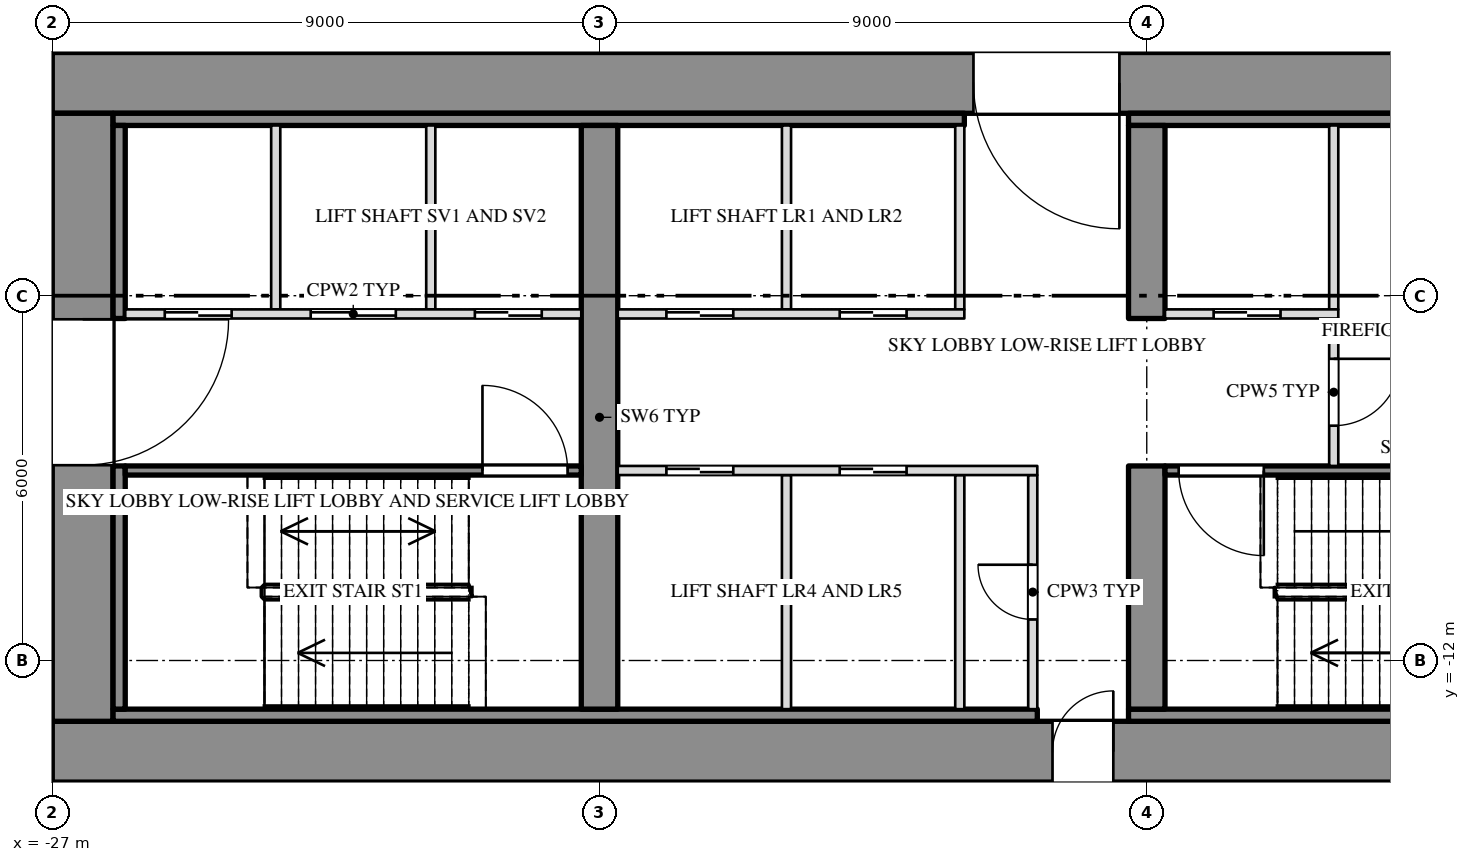
"""IFC4 building model, lengths in metres.
Left out: names, types, materials, properties, quantities, classifications, styles, units other than length and angle.
Written with IfcOpenShell. Run it as: python <this file> out.ifc"""

import sys

from ifc_helpers import new_model, si_unit, direction, frame, frame_2d, origin, place, context, subcontext, project, spatial, rectangle, extrude, element, fill, save


model = new_model("IFC4")
c1 = context("Model", 3, precision=1e-05, world=origin(), true_north=direction((0.0, 1.0)))
c2 = subcontext(c1, "Body", "Model", "MODEL_VIEW")
j1 = project(units=[si_unit("LENGTHUNIT", "METRE"), si_unit("PLANEANGLEUNIT", "RADIAN")], contexts=[c1])
p1 = place(None, origin())
s1 = spatial("IfcSite", under=j1, at=p1, CompositionType="ELEMENT")
p2 = place(p1, origin())
s2 = spatial("IfcBuilding", under=s1, at=p2, CompositionType="ELEMENT")
p3 = place(p2, frame((0.0, 0.0, 156.5)))
s3 = spatial("IfcBuildingStorey", under=s2, at=p3, CompositionType="ELEMENT", Elevation=156.5)
p4 = place(p3, frame((-27.0, -2.5, 0.0), z_axis=(0.0, 0.0, 1.0), x_axis=(1.0, 0.0, 0.0)))
e1 = element("IfcWall", 1, at=p4, inside=s3, PredefinedType="SHEAR", context=c2, shape_type="SweptSolid", body=[
    extrude(rectangle(XDim=54.0, YDim=1.0, at=frame_2d((27.0, 0.0))), origin(), (0.0, 0.0, 1.0), 3.65),
])
p5 = place(p4, frame((15.15, 0.0, 0.0)))
e2 = element("IfcOpeningElement", 2, at=p5, cuts=e1, PredefinedType="OPENING", context=c2, shape_type="SweptSolid", body=[
    extrude(rectangle(XDim=2.4, YDim=2.1, at=frame_2d((1.2, 1.05))), frame((0.0, 0.512, 0.0), z_axis=(0.0, -1.0, 0.0), x_axis=(1.0, 0.0, 0.0)), (0.0, 0.0, 1.0), 1.024),
])
p6 = place(p4, frame((36.45, 0.0, 0.0)))
e3 = element("IfcOpeningElement", 3, at=p6, cuts=e1, PredefinedType="OPENING", context=c2, shape_type="SweptSolid", body=[
    extrude(rectangle(XDim=2.4, YDim=2.1, at=frame_2d((1.2, 1.05))), frame((0.0, 0.512, 0.0), z_axis=(0.0, -1.0, 0.0), x_axis=(1.0, 0.0, 0.0)), (0.0, 0.0, 1.0), 1.024),
])
p7 = place(p3, frame((-27.0, -13.5, 0.0), z_axis=(0.0, 0.0, 1.0), x_axis=(1.0, 0.0, 0.0)))
e4 = element("IfcWall", 4, at=p7, inside=s3, PredefinedType="SHEAR", context=c2, shape_type="SweptSolid", body=[
    extrude(rectangle(XDim=54.0, YDim=1.0, at=frame_2d((27.0, 0.0))), origin(), (0.0, 0.0, 1.0), 3.65),
])
p8 = place(p7, frame((16.45, 0.0, 0.0)))
e5 = element("IfcOpeningElement", 5, at=p8, cuts=e4, PredefinedType="OPENING", context=c2, shape_type="SweptSolid", body=[
    extrude(rectangle(XDim=1.0, YDim=2.1, at=frame_2d((0.5, 1.05))), frame((0.0, 0.512, 0.0), z_axis=(0.0, -1.0, 0.0), x_axis=(1.0, 0.0, 0.0)), (0.0, 0.0, 1.0), 1.024),
])
p9 = place(p7, frame((36.55, 0.0, 0.0)))
e6 = element("IfcOpeningElement", 6, at=p9, cuts=e4, PredefinedType="OPENING", context=c2, shape_type="SweptSolid", body=[
    extrude(rectangle(XDim=1.0, YDim=2.1, at=frame_2d((0.5, 1.05))), frame((0.0, 0.512, 0.0), z_axis=(0.0, -1.0, 0.0), x_axis=(1.0, 0.0, 0.0)), (0.0, 0.0, 1.0), 1.024),
])
p10 = place(p3, frame((-26.5, -13.0, 0.0), z_axis=(0.0, 0.0, 1.0), x_axis=(0.0, 1.0, 0.0)))
e7 = element("IfcWall", 7, at=p10, inside=s3, PredefinedType="SHEAR", context=c2, shape_type="SweptSolid", body=[
    extrude(rectangle(XDim=10.0, YDim=1.0, at=frame_2d((5.0, 0.0))), origin(), (0.0, 0.0, 1.0), 3.65),
])
p11 = place(p10, frame((4.212, 0.0, 0.0)))
e8 = element("IfcOpeningElement", 8, at=p11, cuts=e7, PredefinedType="OPENING", context=c2, shape_type="SweptSolid", body=[
    extrude(rectangle(XDim=2.4, YDim=2.1, at=frame_2d((1.2, 1.05))), frame((0.0, 0.512, 0.0), z_axis=(0.0, -1.0, 0.0), x_axis=(1.0, 0.0, 0.0)), (0.0, 0.0, 1.0), 1.024),
])
p12 = place(p3, frame((-26.0, -3.1, 0.0), z_axis=(0.0, 0.0, 1.0), x_axis=(1.0, 0.0, 0.0)))
e9 = element("IfcWall", 9, at=p12, inside=s3, PredefinedType="SHEAR", context=c2, shape_type="SweptSolid", body=[
    extrude(rectangle(XDim=14.0, YDim=0.2, at=frame_2d((7.0, 0.0))), origin(), (0.0, 0.0, 1.0), 3.65),
])
p13 = place(p3, frame((-9.3, -3.1, 0.0), z_axis=(0.0, 0.0, 1.0), x_axis=(1.0, 0.0, 0.0)))
e10 = element("IfcWall", 10, at=p13, inside=s3, PredefinedType="SHEAR", context=c2, shape_type="SweptSolid", body=[
    extrude(rectangle(XDim=18.6, YDim=0.2, at=frame_2d((9.3, 0.0))), origin(), (0.0, 0.0, 1.0), 3.65),
])
p14 = place(p3, frame((-26.0, -12.9, 0.0), z_axis=(0.0, 0.0, 1.0), x_axis=(1.0, 0.0, 0.0)))
e11 = element("IfcWall", 11, at=p14, inside=s3, PredefinedType="SHEAR", context=c2, shape_type="SweptSolid", body=[
    extrude(rectangle(XDim=15.2, YDim=0.2, at=frame_2d((7.6, 0.0))), origin(), (0.0, 0.0, 1.0), 3.65),
])
p15 = place(p3, frame((-9.3, -12.9, 0.0), z_axis=(0.0, 0.0, 1.0), x_axis=(1.0, 0.0, 0.0)))
e12 = element("IfcWall", 12, at=p15, inside=s3, PredefinedType="SHEAR", context=c2, shape_type="SweptSolid", body=[
    extrude(rectangle(XDim=18.6, YDim=0.2, at=frame_2d((9.3, 0.0))), origin(), (0.0, 0.0, 1.0), 3.65),
])
p16 = place(p3, frame((-25.9, -12.8, 0.0), z_axis=(0.0, 0.0, 1.0), x_axis=(0.0, 1.0, 0.0)))
e13 = element("IfcWall", 13, at=p16, inside=s3, PredefinedType="SHEAR", context=c2, shape_type="SweptSolid", body=[
    extrude(rectangle(XDim=4.0, YDim=0.2, at=frame_2d((2.0, 0.0))), origin(), (0.0, 0.0, 1.0), 3.65),
])
p17 = place(p3, frame((-25.9, -6.375, 0.0), z_axis=(0.0, 0.0, 1.0), x_axis=(0.0, 1.0, 0.0)))
e14 = element("IfcWall", 14, at=p17, inside=s3, PredefinedType="SHEAR", context=c2, shape_type="SweptSolid", body=[
    extrude(rectangle(XDim=3.175, YDim=0.2, at=frame_2d((1.587, 0.0))), origin(), (0.0, 0.0, 1.0), 3.65),
])
p18 = place(p3, frame((-18.0, -12.8, 0.0), z_axis=(0.0, 0.0, 1.0), x_axis=(0.0, 1.0, 0.0)))
e15 = element("IfcWall", 15, at=p18, inside=s3, PredefinedType="SHEAR", context=c2, shape_type="SweptSolid", body=[
    extrude(rectangle(XDim=9.6, YDim=0.6, at=frame_2d((4.8, 0.0))), origin(), (0.0, 0.0, 1.0), 3.65),
])
p19 = place(p3, frame((-9.0, -12.8, 0.0), z_axis=(0.0, 0.0, 1.0), x_axis=(0.0, 1.0, 0.0)))
e16 = element("IfcWall", 16, at=p19, inside=s3, PredefinedType="SHEAR", context=c2, shape_type="SweptSolid", body=[
    extrude(rectangle(XDim=4.0, YDim=0.6, at=frame_2d((2.0, 0.0))), origin(), (0.0, 0.0, 1.0), 3.65),
])
p20 = place(p3, frame((-9.0, -6.375, 0.0), z_axis=(0.0, 0.0, 1.0), x_axis=(0.0, 1.0, 0.0)))
e17 = element("IfcWall", 17, at=p20, inside=s3, PredefinedType="SHEAR", context=c2, shape_type="SweptSolid", body=[
    extrude(rectangle(XDim=3.175, YDim=0.6, at=frame_2d((1.587, 0.0))), origin(), (0.0, 0.0, 1.0), 3.65),
])
for number, where, z_axis, x_axis in (
    (18, (-20.775, -6.225, 0.0), (0.0, 0.0, 1.0), (0.0, 1.0, 0.0)),
    (19, (-23.325, -6.225, 0.0), (0.0, 0.0, 1.0), (0.0, 1.0, 0.0)),
    (20, (-12.075, -6.225, 0.0), (0.0, 0.0, 1.0), (0.0, 1.0, 0.0)),
    (21, (-14.925, -6.225, 0.0), (0.0, 0.0, 1.0), (0.0, 1.0, 0.0)),
    (22, (-5.925, -6.225, 0.0), (0.0, 0.0, 1.0), (0.0, 1.0, 0.0)),
):
    element("IfcWall", number, at=place(p3, frame(where, z_axis=z_axis, x_axis=x_axis)), inside=s3, PredefinedType="PARTITIONING", context=c2, shape_type="SweptSolid", body=[
        extrude(rectangle(XDim=3.025, YDim=0.15, at=frame_2d((1.513, 0.0))), origin(), (0.0, 0.0, 1.0), 3.65),
    ])
p21 = place(p3, frame((-10.875, -12.8, 0.0), z_axis=(0.0, 0.0, 1.0), x_axis=(0.0, 1.0, 0.0)))
e23 = element("IfcWall", 23, at=p21, inside=s3, PredefinedType="PARTITIONING", context=c2, shape_type="SweptSolid", body=[
    extrude(rectangle(XDim=3.85, YDim=0.15, at=frame_2d((1.925, 0.0))), origin(), (0.0, 0.0, 1.0), 3.65),
])
p22 = place(p21, frame((1.475, 0.0, 0.0)))
e24 = element("IfcOpeningElement", 24, at=p22, cuts=e23, PredefinedType="OPENING", context=c2, shape_type="SweptSolid", body=[
    extrude(rectangle(XDim=0.9, YDim=2.1, at=frame_2d((0.45, 1.05))), frame((0.0, 0.087, 0.0), z_axis=(0.0, -1.0, 0.0), x_axis=(1.0, 0.0, 0.0)), (0.0, 0.0, 1.0), 0.174),
])
for number, where, z_axis, x_axis in (
    (25, (-12.075, -12.8, 0.0), (0.0, 0.0, 1.0), (0.0, 1.0, 0.0)),
    (26, (-14.925, -12.8, 0.0), (0.0, 0.0, 1.0), (0.0, 1.0, 0.0)),
):
    element("IfcWall", number, at=place(p3, frame(where, z_axis=z_axis, x_axis=x_axis)), inside=s3, PredefinedType="PARTITIONING", context=c2, shape_type="SweptSolid", body=[
        extrude(rectangle(XDim=3.85, YDim=0.15, at=frame_2d((1.925, 0.0))), origin(), (0.0, 0.0, 1.0), 3.65),
    ])
p23 = place(p3, frame((-5.925, -8.8, 0.0), z_axis=(0.0, 0.0, 1.0), x_axis=(0.0, 1.0, 0.0)))
e27 = element("IfcWall", 27, at=p23, inside=s3, PredefinedType="PARTITIONING", context=c2, shape_type="SweptSolid", body=[
    extrude(rectangle(XDim=2.425, YDim=0.15, at=frame_2d((1.212, 0.0))), origin(), (0.0, 0.0, 1.0), 3.65),
])
p24 = place(p23, frame((0.662, 0.0, 0.0)))
e28 = element("IfcOpeningElement", 28, at=p24, cuts=e27, PredefinedType="OPENING", context=c2, shape_type="SweptSolid", body=[
    extrude(rectangle(XDim=1.1, YDim=2.1, at=frame_2d((0.55, 1.05))), frame((0.0, 0.087, 0.0), z_axis=(0.0, -1.0, 0.0), x_axis=(1.0, 0.0, 0.0)), (0.0, 0.0, 1.0), 0.174),
])
p25 = place(p3, frame((-25.8, -6.3, 0.0), z_axis=(0.0, 0.0, 1.0), x_axis=(1.0, 0.0, 0.0)))
e29 = element("IfcWall", 29, at=p25, inside=s3, PredefinedType="PARTITIONING", context=c2, shape_type="SweptSolid", body=[
    extrude(rectangle(XDim=7.5, YDim=0.15, at=frame_2d((3.75, 0.0))), origin(), (0.0, 0.0, 1.0), 3.65),
])
p26 = place(p25, frame((0.65, 0.0, 0.0)))
e30 = element("IfcOpeningElement", 30, at=p26, cuts=e29, PredefinedType="OPENING", context=c2, shape_type="SweptSolid", body=[
    extrude(rectangle(XDim=1.1, YDim=2.1, at=frame_2d((0.55, 1.05))), frame((0.0, 0.087, 0.0), z_axis=(0.0, -1.0, 0.0), x_axis=(1.0, 0.0, 0.0)), (0.0, 0.0, 1.0), 0.174),
])
p27 = place(p25, frame((3.05, 0.0, 0.0)))
e31 = element("IfcOpeningElement", 31, at=p27, cuts=e29, PredefinedType="OPENING", context=c2, shape_type="SweptSolid", body=[
    extrude(rectangle(XDim=1.4, YDim=2.1, at=frame_2d((0.7, 1.05))), frame((0.0, 0.087, 0.0), z_axis=(0.0, -1.0, 0.0), x_axis=(1.0, 0.0, 0.0)), (0.0, 0.0, 1.0), 0.174),
])
p28 = place(p25, frame((5.75, 0.0, 0.0)))
e32 = element("IfcOpeningElement", 32, at=p28, cuts=e29, PredefinedType="OPENING", context=c2, shape_type="SweptSolid", body=[
    extrude(rectangle(XDim=1.1, YDim=2.1, at=frame_2d((0.55, 1.05))), frame((0.0, 0.087, 0.0), z_axis=(0.0, -1.0, 0.0), x_axis=(1.0, 0.0, 0.0)), (0.0, 0.0, 1.0), 0.174),
])
p29 = place(p3, frame((-17.7, -6.3, 0.0), z_axis=(0.0, 0.0, 1.0), x_axis=(1.0, 0.0, 0.0)))
e33 = element("IfcWall", 33, at=p29, inside=s3, PredefinedType="PARTITIONING", context=c2, shape_type="SweptSolid", body=[
    extrude(rectangle(XDim=5.7, YDim=0.15, at=frame_2d((2.85, 0.0))), origin(), (0.0, 0.0, 1.0), 3.65),
])
p30 = place(p29, frame((0.8, 0.0, 0.0)))
e34 = element("IfcOpeningElement", 34, at=p30, cuts=e33, PredefinedType="OPENING", context=c2, shape_type="SweptSolid", body=[
    extrude(rectangle(XDim=1.1, YDim=2.1, at=frame_2d((0.55, 1.05))), frame((0.0, 0.087, 0.0), z_axis=(0.0, -1.0, 0.0), x_axis=(1.0, 0.0, 0.0)), (0.0, 0.0, 1.0), 0.174),
])
p31 = place(p29, frame((3.65, 0.0, 0.0)))
e35 = element("IfcOpeningElement", 35, at=p31, cuts=e33, PredefinedType="OPENING", context=c2, shape_type="SweptSolid", body=[
    extrude(rectangle(XDim=1.1, YDim=2.1, at=frame_2d((0.55, 1.05))), frame((0.0, 0.087, 0.0), z_axis=(0.0, -1.0, 0.0), x_axis=(1.0, 0.0, 0.0)), (0.0, 0.0, 1.0), 0.174),
])
p32 = place(p3, frame((-8.7, -6.3, 0.0), z_axis=(0.0, 0.0, 1.0), x_axis=(1.0, 0.0, 0.0)))
e36 = element("IfcWall", 36, at=p32, inside=s3, PredefinedType="PARTITIONING", context=c2, shape_type="SweptSolid", body=[
    extrude(rectangle(XDim=2.85, YDim=0.15, at=frame_2d((1.425, 0.0))), origin(), (0.0, 0.0, 1.0), 3.65),
])
p33 = place(p32, frame((0.8, 0.0, 0.0)))
e37 = element("IfcOpeningElement", 37, at=p33, cuts=e36, PredefinedType="OPENING", context=c2, shape_type="SweptSolid", body=[
    extrude(rectangle(XDim=1.1, YDim=2.1, at=frame_2d((0.55, 1.05))), frame((0.0, 0.087, 0.0), z_axis=(0.0, -1.0, 0.0), x_axis=(1.0, 0.0, 0.0)), (0.0, 0.0, 1.0), 0.174),
])
p34 = place(p3, frame((-25.8, -8.875, 0.0), z_axis=(0.0, 0.0, 1.0), x_axis=(1.0, 0.0, 0.0)))
e38 = element("IfcWall", 38, at=p34, inside=s3, PredefinedType="SHEAR", context=c2, shape_type="SweptSolid", body=[
    extrude(rectangle(XDim=7.5, YDim=0.15, at=frame_2d((3.75, 0.0))), origin(), (0.0, 0.0, 1.0), 3.65),
])
p35 = place(p34, frame((5.875, 0.0, 0.0)))
e39 = element("IfcOpeningElement", 39, at=p35, cuts=e38, PredefinedType="OPENING", context=c2, shape_type="SweptSolid", body=[
    extrude(rectangle(XDim=1.4, YDim=2.1, at=frame_2d((0.7, 1.05))), frame((0.0, 0.087, 0.0), z_axis=(0.0, -1.0, 0.0), x_axis=(1.0, 0.0, 0.0)), (0.0, 0.0, 1.0), 0.174),
])
p36 = place(p3, frame((-17.7, -8.875, 0.0), z_axis=(0.0, 0.0, 1.0), x_axis=(1.0, 0.0, 0.0)))
e40 = element("IfcWall", 40, at=p36, inside=s3, PredefinedType="PARTITIONING", context=c2, shape_type="SweptSolid", body=[
    extrude(rectangle(XDim=6.9, YDim=0.15, at=frame_2d((3.45, 0.0))), origin(), (0.0, 0.0, 1.0), 3.65),
])
p37 = place(p36, frame((0.8, 0.0, 0.0)))
e41 = element("IfcOpeningElement", 41, at=p37, cuts=e40, PredefinedType="OPENING", context=c2, shape_type="SweptSolid", body=[
    extrude(rectangle(XDim=1.1, YDim=2.1, at=frame_2d((0.55, 1.05))), frame((0.0, 0.087, 0.0), z_axis=(0.0, -1.0, 0.0), x_axis=(1.0, 0.0, 0.0)), (0.0, 0.0, 1.0), 0.174),
])
p38 = place(p36, frame((3.65, 0.0, 0.0)))
e42 = element("IfcOpeningElement", 42, at=p38, cuts=e40, PredefinedType="OPENING", context=c2, shape_type="SweptSolid", body=[
    extrude(rectangle(XDim=1.1, YDim=2.1, at=frame_2d((0.55, 1.05))), frame((0.0, 0.087, 0.0), z_axis=(0.0, -1.0, 0.0), x_axis=(1.0, 0.0, 0.0)), (0.0, 0.0, 1.0), 0.174),
])
p39 = place(p3, frame((-8.7, -8.875, 0.0), z_axis=(0.0, 0.0, 1.0), x_axis=(1.0, 0.0, 0.0)))
e43 = element("IfcWall", 43, at=p39, inside=s3, PredefinedType="SHEAR", context=c2, shape_type="SweptSolid", body=[
    extrude(rectangle(XDim=8.4, YDim=0.15, at=frame_2d((4.2, 0.0))), origin(), (0.0, 0.0, 1.0), 3.65),
])
p40 = place(p39, frame((0.225, 0.0, 0.0)))
e44 = element("IfcOpeningElement", 44, at=p40, cuts=e43, PredefinedType="OPENING", context=c2, shape_type="SweptSolid", body=[
    extrude(rectangle(XDim=1.4, YDim=2.1, at=frame_2d((0.7, 1.05))), frame((0.0, 0.087, 0.0), z_axis=(0.0, -1.0, 0.0), x_axis=(1.0, 0.0, 0.0)), (0.0, 0.0, 1.0), 0.174),
])
p41 = place(p11, origin())
e45 = element("IfcDoor", 45, at=p41, inside=s3, OperationType="DOUBLE_DOOR_SINGLE_SWING", PredefinedType="DOOR", context=c2, shape_type="SweptSolid", body=[
    extrude(rectangle(XDim=2.4, YDim=2.1, at=frame_2d((1.2, 1.05))), frame((0.0, 0.025, 0.0), z_axis=(0.0, -1.0, 0.0), x_axis=(1.0, 0.0, 0.0)), (0.0, 0.0, 1.0), 0.05),
])
fill(e8, e45)
p42 = place(p26, origin())
e46 = element("IfcDoor", 46, at=p42, inside=s3, OperationType="SLIDING_TO_RIGHT", PredefinedType="DOOR", context=c2, shape_type="SweptSolid", body=[
    extrude(rectangle(XDim=1.1, YDim=2.1, at=frame_2d((0.55, 1.05))), frame((0.0, 0.025, 0.0), z_axis=(0.0, -1.0, 0.0), x_axis=(1.0, 0.0, 0.0)), (0.0, 0.0, 1.0), 0.05),
])
fill(e30, e46)
p43 = place(p27, origin())
e47 = element("IfcDoor", 47, at=p43, inside=s3, OperationType="SLIDING_TO_LEFT", PredefinedType="DOOR", context=c2, shape_type="SweptSolid", body=[
    extrude(rectangle(XDim=1.4, YDim=2.1, at=frame_2d((0.7, 1.05))), frame((0.0, 0.025, 0.0), z_axis=(0.0, -1.0, 0.0), x_axis=(1.0, 0.0, 0.0)), (0.0, 0.0, 1.0), 0.05),
])
fill(e31, e47)
p44 = place(p28, origin())
e48 = element("IfcDoor", 48, at=p44, inside=s3, OperationType="SLIDING_TO_RIGHT", PredefinedType="DOOR", context=c2, shape_type="SweptSolid", body=[
    extrude(rectangle(XDim=1.1, YDim=2.1, at=frame_2d((0.55, 1.05))), frame((0.0, 0.025, 0.0), z_axis=(0.0, -1.0, 0.0), x_axis=(1.0, 0.0, 0.0)), (0.0, 0.0, 1.0), 0.05),
])
fill(e32, e48)
p45 = place(p35, origin())
e49 = element("IfcDoor", 49, at=p45, inside=s3, OperationType="DOUBLE_DOOR_SINGLE_SWING", PredefinedType="DOOR", context=c2, shape_type="SweptSolid", body=[
    extrude(rectangle(XDim=1.4, YDim=2.1, at=frame_2d((0.7, 1.05))), frame((0.0, 0.025, 0.0), z_axis=(0.0, -1.0, 0.0), x_axis=(1.0, 0.0, 0.0)), (0.0, 0.0, 1.0), 0.05),
])
fill(e39, e49)
p46 = place(p37, origin())
e50 = element("IfcDoor", 50, at=p46, inside=s3, OperationType="SLIDING_TO_RIGHT", PredefinedType="DOOR", context=c2, shape_type="SweptSolid", body=[
    extrude(rectangle(XDim=1.1, YDim=2.1, at=frame_2d((0.55, 1.05))), frame((0.0, 0.025, 0.0), z_axis=(0.0, -1.0, 0.0), x_axis=(1.0, 0.0, 0.0)), (0.0, 0.0, 1.0), 0.05),
])
fill(e41, e50)
p47 = place(p30, origin())
e51 = element("IfcDoor", 51, at=p47, inside=s3, OperationType="SLIDING_TO_LEFT", PredefinedType="DOOR", context=c2, shape_type="SweptSolid", body=[
    extrude(rectangle(XDim=1.1, YDim=2.1, at=frame_2d((0.55, 1.05))), frame((0.0, 0.025, 0.0), z_axis=(0.0, -1.0, 0.0), x_axis=(1.0, 0.0, 0.0)), (0.0, 0.0, 1.0), 0.05),
])
fill(e34, e51)
p48 = place(p38, origin())
e52 = element("IfcDoor", 52, at=p48, inside=s3, OperationType="SLIDING_TO_RIGHT", PredefinedType="DOOR", context=c2, shape_type="SweptSolid", body=[
    extrude(rectangle(XDim=1.1, YDim=2.1, at=frame_2d((0.55, 1.05))), frame((0.0, 0.025, 0.0), z_axis=(0.0, -1.0, 0.0), x_axis=(1.0, 0.0, 0.0)), (0.0, 0.0, 1.0), 0.05),
])
fill(e42, e52)
p49 = place(p31, origin())
e53 = element("IfcDoor", 53, at=p49, inside=s3, OperationType="SLIDING_TO_LEFT", PredefinedType="DOOR", context=c2, shape_type="SweptSolid", body=[
    extrude(rectangle(XDim=1.1, YDim=2.1, at=frame_2d((0.55, 1.05))), frame((0.0, 0.025, 0.0), z_axis=(0.0, -1.0, 0.0), x_axis=(1.0, 0.0, 0.0)), (0.0, 0.0, 1.0), 0.05),
])
fill(e35, e53)
p50 = place(p22, origin())
e54 = element("IfcDoor", 54, at=p50, inside=s3, OperationType="SINGLE_SWING_RIGHT", PredefinedType="DOOR", context=c2, shape_type="SweptSolid", body=[
    extrude(rectangle(XDim=0.9, YDim=2.1, at=frame_2d((0.45, 1.05))), frame((0.0, 0.025, 0.0), z_axis=(0.0, -1.0, 0.0), x_axis=(1.0, 0.0, 0.0)), (0.0, 0.0, 1.0), 0.05),
])
fill(e24, e54)
p51 = place(p5, origin())
e55 = element("IfcDoor", 55, at=p51, inside=s3, OperationType="DOUBLE_DOOR_SINGLE_SWING", PredefinedType="DOOR", context=c2, shape_type="SweptSolid", body=[
    extrude(rectangle(XDim=2.4, YDim=2.1, at=frame_2d((1.2, 1.05))), frame((0.0, 0.025, 0.0), z_axis=(0.0, -1.0, 0.0), x_axis=(1.0, 0.0, 0.0)), (0.0, 0.0, 1.0), 0.05),
])
fill(e2, e55)
p52 = place(p8, origin())
e56 = element("IfcDoor", 56, at=p52, inside=s3, OperationType="SINGLE_SWING_RIGHT", PredefinedType="DOOR", context=c2, shape_type="SweptSolid", body=[
    extrude(rectangle(XDim=1.0, YDim=2.1, at=frame_2d((0.5, 1.05))), frame((0.0, 0.025, 0.0), z_axis=(0.0, -1.0, 0.0), x_axis=(1.0, 0.0, 0.0)), (0.0, 0.0, 1.0), 0.05),
])
fill(e5, e56)
p53 = place(p40, origin())
e57 = element("IfcDoor", 57, at=p53, inside=s3, OperationType="DOUBLE_DOOR_SINGLE_SWING", PredefinedType="DOOR", context=c2, shape_type="SweptSolid", body=[
    extrude(rectangle(XDim=1.4, YDim=2.1, at=frame_2d((0.7, 1.05))), frame((0.0, 0.025, 0.0), z_axis=(0.0, -1.0, 0.0), x_axis=(1.0, 0.0, 0.0)), (0.0, 0.0, 1.0), 0.05),
])
fill(e44, e57)
p54 = place(p33, origin())
e58 = element("IfcDoor", 58, at=p54, inside=s3, OperationType="SLIDING_TO_RIGHT", PredefinedType="DOOR", context=c2, shape_type="SweptSolid", body=[
    extrude(rectangle(XDim=1.1, YDim=2.1, at=frame_2d((0.55, 1.05))), frame((0.0, 0.025, 0.0), z_axis=(0.0, -1.0, 0.0), x_axis=(1.0, 0.0, 0.0)), (0.0, 0.0, 1.0), 0.05),
])
fill(e37, e58)
p55 = place(p24, origin())
e59 = element("IfcDoor", 59, at=p55, inside=s3, OperationType="SINGLE_SWING_LEFT", PredefinedType="DOOR", context=c2, shape_type="SweptSolid", body=[
    extrude(rectangle(XDim=1.1, YDim=2.1, at=frame_2d((0.55, 1.05))), frame((0.0, 0.025, 0.0), z_axis=(0.0, -1.0, 0.0), x_axis=(1.0, 0.0, 0.0)), (0.0, 0.0, 1.0), 0.05),
])
fill(e28, e59)
save(model, sys.argv[1])
